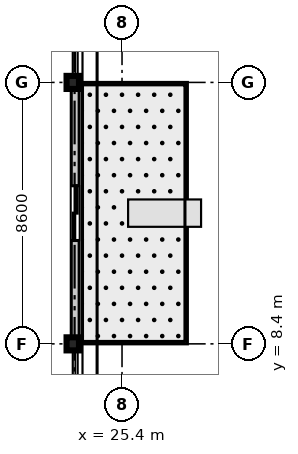
"""IFC4 building model, lengths in metres.
Left out: names, types, materials, properties, quantities, classifications, styles, units other than length and angle.
Written with IfcOpenShell. Run it as: python <this file> out.ifc"""

import sys

from ifc_helpers import new_model, si_unit, direction, frame, frame_2d, origin, origin_2d, place, context, subcontext, project, spatial, rectangle, i_section, extrude, source, transform, mapped, element, fill, save


model = new_model("IFC4")
c1 = context("Model", 3, precision=1e-05, world=origin(), true_north=direction((0.0, 1.0)))
c2 = subcontext(c1, "Body", "Model", "MODEL_VIEW")
j1 = project(units=[si_unit("LENGTHUNIT", "METRE"), si_unit("PLANEANGLEUNIT", "RADIAN")], contexts=[c1])
p1 = place(None, origin())
s1 = spatial("IfcSite", under=j1, at=p1, CompositionType="ELEMENT")
p2 = place(p1, origin())
s2 = spatial("IfcBuilding", under=s1, at=p2, CompositionType="ELEMENT")
p3 = place(p2, frame((0.0, 0.0, 88.3)))
s3 = spatial("IfcBuildingStorey", under=s2, at=p3, CompositionType="ELEMENT", Elevation=88.3)
m1 = source(origin(), c2, "Body", "SweptSolid", [
    extrude(i_section(OverallWidth=0.409, OverallDepth=0.43, WebThickness=0.021, FlangeThickness=0.034, at=origin_2d()), origin(), (0.0, 0.0, 1.0), 3.605),
])
for number, where, z_axis, x_axis in (
    (1, (23.78, 8.4, 0.0), (0.0, 0.0, 1.0), (1.0, 0.0, 0.0)),
    (2, (23.78, 17.0, 0.0), (0.0, 0.0, 1.0), (1.0, 0.0, 0.0)),
):
    element("IfcColumn", number, at=place(p3, frame(where, z_axis=z_axis, x_axis=x_axis)), inside=s3, PredefinedType="COLUMN", context=c2, shape_type="MappedRepresentation", body=[
        mapped(m1, transform((0.0, 0.0, 0.0), scale=1.0)),
    ])
m2 = source(origin(), c2, "Body", "SweptSolid", [
    extrude(rectangle(XDim=8.6, YDim=0.26, at=frame_2d((4.3, 0.0))), origin(), (0.0, 0.0, 1.0), 2.86),
])
p4 = place(p3, frame((23.86, 8.4, 0.0), z_axis=(0.0, 0.0, 1.0), x_axis=(0.0, 1.0, 0.0)))
e3 = element("IfcWall", 3, at=p4, inside=s3, PredefinedType="STANDARD", context=c2, shape_type="MappedRepresentation", body=[
    mapped(m2, transform((0.0, 0.0, 0.0), scale=1.0)),
])
p5 = place(p4, frame((3.4, 0.0, 0.0)))
e4 = element("IfcOpeningElement", 4, at=p5, cuts=e3, PredefinedType="OPENING", context=c2, shape_type="SweptSolid", body=[
    extrude(rectangle(XDim=1.8, YDim=2.25, at=frame_2d((0.9, 1.125))), frame((0.0, 0.14, 0.0), z_axis=(0.0, -1.0, 0.0), x_axis=(1.0, 0.0, 0.0)), (0.0, 0.0, 1.0), 0.28),
])
m3 = source(origin(), c2, "Body", "SweptSolid", [
    extrude(rectangle(XDim=1.8, YDim=2.25, at=frame_2d((0.9, 1.125))), frame((0.0, 0.025, 0.0), z_axis=(0.0, -1.0, 0.0), x_axis=(1.0, 0.0, 0.0)), (0.0, 0.0, 1.0), 0.05),
])
p6 = place(p5, frame((1.8, 0.0, 0.0), z_axis=(0.0, 0.0, 1.0), x_axis=(-1.0, 0.0, 0.0)))
e5 = element("IfcDoor", 5, at=p6, inside=s3, OperationType="DOUBLE_DOOR_SLIDING", PredefinedType="DOOR", context=c2, shape_type="MappedRepresentation", body=[
    mapped(m3, transform((0.0, 0.0, 0.0), scale=1.0)),
])
fill(e4, e5)
save(model, sys.argv[1])
